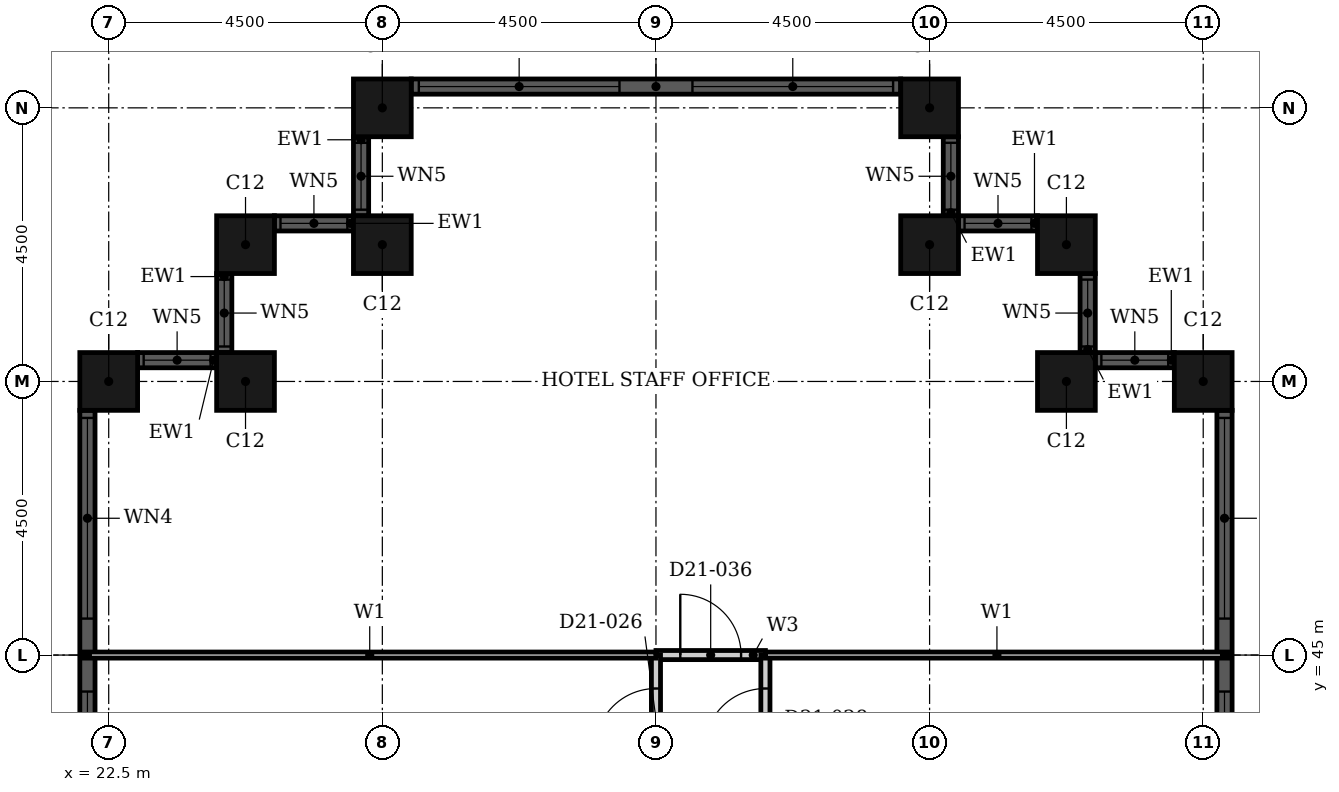
"""IFC4 building model, lengths in metres.
Left out: names, types, materials, properties, quantities, classifications, styles, units other than length and angle.
Written with IfcOpenShell. Run it as: python <this file> out.ifc"""

import sys

from ifc_helpers import new_model, si_unit, direction, frame, frame_2d, origin, origin_2d, place, context, subcontext, project, spatial, rectangle, hollow_rectangle, extrude, element, fill, save


model = new_model("IFC4")
c1 = context("Model", 3, precision=1e-05, world=origin(), true_north=direction((0.0, 1.0)))
c2 = subcontext(c1, "Body", "Model", "MODEL_VIEW")
j1 = project(units=[si_unit("LENGTHUNIT", "METRE"), si_unit("PLANEANGLEUNIT", "RADIAN")], contexts=[c1])
p1 = place(None, origin())
s1 = spatial("IfcSite", under=j1, at=p1, CompositionType="ELEMENT")
p2 = place(p1, origin())
s2 = spatial("IfcBuilding", under=s1, at=p2, CompositionType="ELEMENT")
p3 = place(p2, frame((0.0, 0.0, 88.8)))
s3 = spatial("IfcBuildingStorey", under=s2, at=p3, CompositionType="ELEMENT", Elevation=88.8)
for number, where, z_axis, x_axis in (
    (1, (40.5, 49.5, 0.0), (0.0, 0.0, 1.0), (1.0, 0.0, 0.0)),
    (2, (38.25, 49.5, 0.0), (0.0, 0.0, 1.0), (1.0, 0.0, 0.0)),
    (3, (38.25, 51.75, 0.0), (0.0, 0.0, 1.0), (1.0, 0.0, 0.0)),
    (4, (36.0, 51.75, 0.0), (0.0, 0.0, 1.0), (1.0, 0.0, 0.0)),
    (5, (36.0, 54.0, 0.0), (0.0, 0.0, 1.0), (1.0, 0.0, 0.0)),
    (6, (27.0, 54.0, 0.0), (0.0, 0.0, 1.0), (1.0, 0.0, 0.0)),
    (7, (27.0, 51.75, 0.0), (0.0, 0.0, 1.0), (1.0, 0.0, 0.0)),
    (8, (24.75, 51.75, 0.0), (0.0, 0.0, 1.0), (1.0, 0.0, 0.0)),
    (9, (24.75, 49.5, 0.0), (0.0, 0.0, 1.0), (1.0, 0.0, 0.0)),
    (10, (22.5, 49.5, 0.0), (0.0, 0.0, 1.0), (1.0, 0.0, 0.0)),
):
    element("IfcColumn", number, at=place(p3, frame(where, z_axis=z_axis, x_axis=x_axis)), inside=s3, PredefinedType="COLUMN", context=c2, shape_type="SweptSolid", body=[
        extrude(hollow_rectangle(XDim=0.95, YDim=0.95, WallThickness=0.03, at=origin_2d()), origin(), (0.0, 0.0, 1.0), 3.6),
    ])
p4 = place(p3, frame((40.85, 40.975, 0.0), z_axis=(0.0, 0.0, 1.0), x_axis=(0.0, 1.0, 0.0)))
e11 = element("IfcWall", 11, at=p4, inside=s3, PredefinedType="SOLIDWALL", context=c2, shape_type="SweptSolid", body=[
    extrude(rectangle(XDim=8.05, YDim=0.25, at=frame_2d((4.025, 0.0))), origin(), (0.0, 0.0, 1.0), 3.6),
])
p5 = place(p4, frame((0.125, 0.0, 0.9)))
e12 = element("IfcOpeningElement", 12, at=p5, cuts=e11, PredefinedType="OPENING", context=c2, shape_type="SweptSolid", body=[
    extrude(rectangle(XDim=3.3, YDim=2.08, at=frame_2d((1.65, 1.04))), frame((0.0, 0.135, 0.0), z_axis=(0.0, -1.0, 0.0), x_axis=(1.0, 0.0, 0.0)), (0.0, 0.0, 1.0), 0.27),
])
p6 = place(p4, frame((4.625, 0.0, 0.9)))
e13 = element("IfcOpeningElement", 13, at=p6, cuts=e11, PredefinedType="OPENING", context=c2, shape_type="SweptSolid", body=[
    extrude(rectangle(XDim=3.3, YDim=2.08, at=frame_2d((1.65, 1.04))), frame((0.0, 0.135, 0.0), z_axis=(0.0, -1.0, 0.0), x_axis=(1.0, 0.0, 0.0)), (0.0, 0.0, 1.0), 0.27),
])
p7 = place(p3, frame((40.025, 49.85, 0.0), z_axis=(0.0, 0.0, 1.0), x_axis=(-1.0, 0.0, 0.0)))
e14 = element("IfcWall", 14, at=p7, inside=s3, PredefinedType="SOLIDWALL", context=c2, shape_type="SweptSolid", body=[
    extrude(rectangle(XDim=1.3, YDim=0.25, at=frame_2d((0.65, 0.0))), origin(), (0.0, 0.0, 1.0), 3.6),
])
p8 = place(p7, frame((0.1, 0.0, 0.9)))
e15 = element("IfcOpeningElement", 15, at=p8, cuts=e14, PredefinedType="OPENING", context=c2, shape_type="SweptSolid", body=[
    extrude(rectangle(XDim=1.1, YDim=2.08, at=frame_2d((0.55, 1.04))), frame((0.0, 0.135, 0.0), z_axis=(0.0, -1.0, 0.0), x_axis=(1.0, 0.0, 0.0)), (0.0, 0.0, 1.0), 0.27),
])
p9 = place(p3, frame((38.6, 49.975, 0.0), z_axis=(0.0, 0.0, 1.0), x_axis=(0.0, 1.0, 0.0)))
e16 = element("IfcWall", 16, at=p9, inside=s3, PredefinedType="SOLIDWALL", context=c2, shape_type="SweptSolid", body=[
    extrude(rectangle(XDim=1.3, YDim=0.25, at=frame_2d((0.65, 0.0))), origin(), (0.0, 0.0, 1.0), 3.6),
])
p10 = place(p9, frame((0.1, 0.0, 0.9)))
e17 = element("IfcOpeningElement", 17, at=p10, cuts=e16, PredefinedType="OPENING", context=c2, shape_type="SweptSolid", body=[
    extrude(rectangle(XDim=1.1, YDim=2.08, at=frame_2d((0.55, 1.04))), frame((0.0, 0.135, 0.0), z_axis=(0.0, -1.0, 0.0), x_axis=(1.0, 0.0, 0.0)), (0.0, 0.0, 1.0), 0.27),
])
p11 = place(p3, frame((37.775, 52.1, 0.0), z_axis=(0.0, 0.0, 1.0), x_axis=(-1.0, 0.0, 0.0)))
e18 = element("IfcWall", 18, at=p11, inside=s3, PredefinedType="SOLIDWALL", context=c2, shape_type="SweptSolid", body=[
    extrude(rectangle(XDim=1.3, YDim=0.25, at=frame_2d((0.65, 0.0))), origin(), (0.0, 0.0, 1.0), 3.6),
])
p12 = place(p11, frame((0.1, 0.0, 0.9)))
e19 = element("IfcOpeningElement", 19, at=p12, cuts=e18, PredefinedType="OPENING", context=c2, shape_type="SweptSolid", body=[
    extrude(rectangle(XDim=1.1, YDim=2.08, at=frame_2d((0.55, 1.04))), frame((0.0, 0.135, 0.0), z_axis=(0.0, -1.0, 0.0), x_axis=(1.0, 0.0, 0.0)), (0.0, 0.0, 1.0), 0.27),
])
p13 = place(p3, frame((36.35, 52.225, 0.0), z_axis=(0.0, 0.0, 1.0), x_axis=(0.0, 1.0, 0.0)))
e20 = element("IfcWall", 20, at=p13, inside=s3, PredefinedType="SOLIDWALL", context=c2, shape_type="SweptSolid", body=[
    extrude(rectangle(XDim=1.3, YDim=0.25, at=frame_2d((0.65, 0.0))), origin(), (0.0, 0.0, 1.0), 3.6),
])
p14 = place(p13, frame((0.1, 0.0, 0.9)))
e21 = element("IfcOpeningElement", 21, at=p14, cuts=e20, PredefinedType="OPENING", context=c2, shape_type="SweptSolid", body=[
    extrude(rectangle(XDim=1.1, YDim=2.08, at=frame_2d((0.55, 1.04))), frame((0.0, 0.135, 0.0), z_axis=(0.0, -1.0, 0.0), x_axis=(1.0, 0.0, 0.0)), (0.0, 0.0, 1.0), 0.27),
])
p15 = place(p3, frame((35.525, 54.35, 0.0), z_axis=(0.0, 0.0, 1.0), x_axis=(-1.0, 0.0, 0.0)))
e22 = element("IfcWall", 22, at=p15, inside=s3, PredefinedType="SOLIDWALL", context=c2, shape_type="SweptSolid", body=[
    extrude(rectangle(XDim=8.05, YDim=0.25, at=frame_2d((4.025, 0.0))), origin(), (0.0, 0.0, 1.0), 3.6),
])
p16 = place(p15, frame((0.125, 0.0, 0.9)))
e23 = element("IfcOpeningElement", 23, at=p16, cuts=e22, PredefinedType="OPENING", context=c2, shape_type="SweptSolid", body=[
    extrude(rectangle(XDim=3.3, YDim=2.08, at=frame_2d((1.65, 1.04))), frame((0.0, 0.135, 0.0), z_axis=(0.0, -1.0, 0.0), x_axis=(1.0, 0.0, 0.0)), (0.0, 0.0, 1.0), 0.27),
])
p17 = place(p15, frame((4.625, 0.0, 0.9)))
e24 = element("IfcOpeningElement", 24, at=p17, cuts=e22, PredefinedType="OPENING", context=c2, shape_type="SweptSolid", body=[
    extrude(rectangle(XDim=3.3, YDim=2.08, at=frame_2d((1.65, 1.04))), frame((0.0, 0.135, 0.0), z_axis=(0.0, -1.0, 0.0), x_axis=(1.0, 0.0, 0.0)), (0.0, 0.0, 1.0), 0.27),
])
p18 = place(p3, frame((26.65, 53.525, 0.0), z_axis=(0.0, 0.0, 1.0), x_axis=(0.0, -1.0, 0.0)))
e25 = element("IfcWall", 25, at=p18, inside=s3, PredefinedType="SOLIDWALL", context=c2, shape_type="SweptSolid", body=[
    extrude(rectangle(XDim=1.3, YDim=0.25, at=frame_2d((0.65, 0.0))), origin(), (0.0, 0.0, 1.0), 3.6),
])
p19 = place(p18, frame((0.1, 0.0, 0.9)))
e26 = element("IfcOpeningElement", 26, at=p19, cuts=e25, PredefinedType="OPENING", context=c2, shape_type="SweptSolid", body=[
    extrude(rectangle(XDim=1.1, YDim=2.08, at=frame_2d((0.55, 1.04))), frame((0.0, 0.135, 0.0), z_axis=(0.0, -1.0, 0.0), x_axis=(1.0, 0.0, 0.0)), (0.0, 0.0, 1.0), 0.27),
])
p20 = place(p3, frame((26.525, 52.1, 0.0), z_axis=(0.0, 0.0, 1.0), x_axis=(-1.0, 0.0, 0.0)))
e27 = element("IfcWall", 27, at=p20, inside=s3, PredefinedType="SOLIDWALL", context=c2, shape_type="SweptSolid", body=[
    extrude(rectangle(XDim=1.3, YDim=0.25, at=frame_2d((0.65, 0.0))), origin(), (0.0, 0.0, 1.0), 3.6),
])
p21 = place(p20, frame((0.1, 0.0, 0.9)))
e28 = element("IfcOpeningElement", 28, at=p21, cuts=e27, PredefinedType="OPENING", context=c2, shape_type="SweptSolid", body=[
    extrude(rectangle(XDim=1.1, YDim=2.08, at=frame_2d((0.55, 1.04))), frame((0.0, 0.135, 0.0), z_axis=(0.0, -1.0, 0.0), x_axis=(1.0, 0.0, 0.0)), (0.0, 0.0, 1.0), 0.27),
])
p22 = place(p3, frame((24.4, 51.275, 0.0), z_axis=(0.0, 0.0, 1.0), x_axis=(0.0, -1.0, 0.0)))
e29 = element("IfcWall", 29, at=p22, inside=s3, PredefinedType="SOLIDWALL", context=c2, shape_type="SweptSolid", body=[
    extrude(rectangle(XDim=1.3, YDim=0.25, at=frame_2d((0.65, 0.0))), origin(), (0.0, 0.0, 1.0), 3.6),
])
p23 = place(p22, frame((0.1, 0.0, 0.9)))
e30 = element("IfcOpeningElement", 30, at=p23, cuts=e29, PredefinedType="OPENING", context=c2, shape_type="SweptSolid", body=[
    extrude(rectangle(XDim=1.1, YDim=2.08, at=frame_2d((0.55, 1.04))), frame((0.0, 0.135, 0.0), z_axis=(0.0, -1.0, 0.0), x_axis=(1.0, 0.0, 0.0)), (0.0, 0.0, 1.0), 0.27),
])
p24 = place(p3, frame((24.275, 49.85, 0.0), z_axis=(0.0, 0.0, 1.0), x_axis=(-1.0, 0.0, 0.0)))
e31 = element("IfcWall", 31, at=p24, inside=s3, PredefinedType="SOLIDWALL", context=c2, shape_type="SweptSolid", body=[
    extrude(rectangle(XDim=1.3, YDim=0.25, at=frame_2d((0.65, 0.0))), origin(), (0.0, 0.0, 1.0), 3.6),
])
p25 = place(p24, frame((0.1, 0.0, 0.9)))
e32 = element("IfcOpeningElement", 32, at=p25, cuts=e31, PredefinedType="OPENING", context=c2, shape_type="SweptSolid", body=[
    extrude(rectangle(XDim=1.1, YDim=2.08, at=frame_2d((0.55, 1.04))), frame((0.0, 0.135, 0.0), z_axis=(0.0, -1.0, 0.0), x_axis=(1.0, 0.0, 0.0)), (0.0, 0.0, 1.0), 0.27),
])
p26 = place(p3, frame((22.15, 49.025, 0.0), z_axis=(0.0, 0.0, 1.0), x_axis=(0.0, -1.0, 0.0)))
e33 = element("IfcWall", 33, at=p26, inside=s3, PredefinedType="SOLIDWALL", context=c2, shape_type="SweptSolid", body=[
    extrude(rectangle(XDim=8.05, YDim=0.25, at=frame_2d((4.025, 0.0))), origin(), (0.0, 0.0, 1.0), 3.6),
])
p27 = place(p26, frame((0.125, 0.0, 0.9)))
e34 = element("IfcOpeningElement", 34, at=p27, cuts=e33, PredefinedType="OPENING", context=c2, shape_type="SweptSolid", body=[
    extrude(rectangle(XDim=3.3, YDim=2.08, at=frame_2d((1.65, 1.04))), frame((0.0, 0.135, 0.0), z_axis=(0.0, -1.0, 0.0), x_axis=(1.0, 0.0, 0.0)), (0.0, 0.0, 1.0), 0.27),
])
p28 = place(p26, frame((4.625, 0.0, 0.9)))
e35 = element("IfcOpeningElement", 35, at=p28, cuts=e33, PredefinedType="OPENING", context=c2, shape_type="SweptSolid", body=[
    extrude(rectangle(XDim=3.3, YDim=2.08, at=frame_2d((1.65, 1.04))), frame((0.0, 0.135, 0.0), z_axis=(0.0, -1.0, 0.0), x_axis=(1.0, 0.0, 0.0)), (0.0, 0.0, 1.0), 0.27),
])
p29 = place(p3, frame((31.5, 45.0, 0.0), z_axis=(0.0, 0.0, 1.0), x_axis=(1.0, 0.0, 0.0)))
e36 = element("IfcWall", 36, at=p29, inside=s3, PredefinedType="PARTITIONING", context=c2, shape_type="SweptSolid", body=[
    extrude(rectangle(XDim=1.8, YDim=0.15, at=frame_2d((0.9, 0.0))), origin(), (0.0, 0.0, 1.0), 3.3),
])
p30 = place(p29, frame((0.4, 0.0, 0.0)))
e37 = element("IfcOpeningElement", 37, at=p30, cuts=e36, PredefinedType="OPENING", context=c2, shape_type="SweptSolid", body=[
    extrude(rectangle(XDim=1.0, YDim=2.1, at=frame_2d((0.5, 1.05))), frame((0.0, 0.085, 0.0), z_axis=(0.0, -1.0, 0.0), x_axis=(1.0, 0.0, 0.0)), (0.0, 0.0, 1.0), 0.17),
])
p31 = place(p3, frame((31.5, 33.3, 0.0), z_axis=(0.0, 0.0, 1.0), x_axis=(0.0, 1.0, 0.0)))
e38 = element("IfcWall", 38, at=p31, inside=s3, PredefinedType="PARTITIONING", context=c2, shape_type="SweptSolid", body=[
    extrude(rectangle(XDim=11.7, YDim=0.15, at=frame_2d((5.85, 0.0))), origin(), (0.0, 0.0, 1.0), 2.58),
])
p32 = place(p31, frame((10.15, 0.0, 0.0)))
e39 = element("IfcOpeningElement", 39, at=p32, cuts=e38, PredefinedType="OPENING", context=c2, shape_type="SweptSolid", body=[
    extrude(rectangle(XDim=1.0, YDim=2.1, at=frame_2d((0.5, 1.05))), frame((0.0, 0.085, 0.0), z_axis=(0.0, -1.0, 0.0), x_axis=(1.0, 0.0, 0.0)), (0.0, 0.0, 1.0), 0.17),
])
p33 = place(p3, frame((33.3, 33.3, 0.0), z_axis=(0.0, 0.0, 1.0), x_axis=(0.0, 1.0, 0.0)))
e40 = element("IfcWall", 40, at=p33, inside=s3, PredefinedType="PARTITIONING", context=c2, shape_type="SweptSolid", body=[
    extrude(rectangle(XDim=11.7, YDim=0.15, at=frame_2d((5.85, 0.0))), origin(), (0.0, 0.0, 1.0), 3.3),
])
p34 = place(p33, frame((10.15, 0.0, 0.0)))
e41 = element("IfcOpeningElement", 41, at=p34, cuts=e40, PredefinedType="OPENING", context=c2, shape_type="SweptSolid", body=[
    extrude(rectangle(XDim=1.0, YDim=2.1, at=frame_2d((0.5, 1.05))), frame((0.0, 0.085, 0.0), z_axis=(0.0, -1.0, 0.0), x_axis=(1.0, 0.0, 0.0)), (0.0, 0.0, 1.0), 0.17),
])
p35 = place(p3, frame((33.3, 45.0, 0.0), z_axis=(0.0, 0.0, 1.0), x_axis=(1.0, 0.0, 0.0)))
e42 = element("IfcWall", 42, at=p35, inside=s3, PredefinedType="PARTITIONING", context=c2, shape_type="SweptSolid", body=[
    extrude(rectangle(XDim=7.615, YDim=0.1, at=frame_2d((3.808, 0.0))), origin(), (0.0, 0.0, 1.0), 3.3),
])
p36 = place(p3, frame((22.085, 45.0, 0.0), z_axis=(0.0, 0.0, 1.0), x_axis=(1.0, 0.0, 0.0)))
e43 = element("IfcWall", 43, at=p36, inside=s3, PredefinedType="PARTITIONING", context=c2, shape_type="SweptSolid", body=[
    extrude(rectangle(XDim=9.415, YDim=0.1, at=frame_2d((4.708, 0.0))), origin(), (0.0, 0.0, 1.0), 3.3),
])
p37 = place(p5, origin())
e44 = element("IfcWindow", 44, at=p37, inside=s3, PartitioningType="SINGLE_PANEL", PredefinedType="WINDOW", context=c2, shape_type="SweptSolid", body=[
    extrude(rectangle(XDim=3.3, YDim=2.08, at=frame_2d((1.65, 1.04))), frame((0.0, 0.03, 0.0), z_axis=(0.0, -1.0, 0.0), x_axis=(1.0, 0.0, 0.0)), (0.0, 0.0, 1.0), 0.06),
])
fill(e12, e44)
p38 = place(p6, origin())
e45 = element("IfcWindow", 45, at=p38, inside=s3, PartitioningType="SINGLE_PANEL", PredefinedType="WINDOW", context=c2, shape_type="SweptSolid", body=[
    extrude(rectangle(XDim=3.3, YDim=2.08, at=frame_2d((1.65, 1.04))), frame((0.0, 0.03, 0.0), z_axis=(0.0, -1.0, 0.0), x_axis=(1.0, 0.0, 0.0)), (0.0, 0.0, 1.0), 0.06),
])
fill(e13, e45)
p39 = place(p8, origin())
e46 = element("IfcWindow", 46, at=p39, inside=s3, PartitioningType="SINGLE_PANEL", PredefinedType="WINDOW", context=c2, shape_type="SweptSolid", body=[
    extrude(rectangle(XDim=1.1, YDim=2.08, at=frame_2d((0.55, 1.04))), frame((0.0, 0.03, 0.0), z_axis=(0.0, -1.0, 0.0), x_axis=(1.0, 0.0, 0.0)), (0.0, 0.0, 1.0), 0.06),
])
fill(e15, e46)
p40 = place(p10, origin())
e47 = element("IfcWindow", 47, at=p40, inside=s3, PartitioningType="SINGLE_PANEL", PredefinedType="WINDOW", context=c2, shape_type="SweptSolid", body=[
    extrude(rectangle(XDim=1.1, YDim=2.08, at=frame_2d((0.55, 1.04))), frame((0.0, 0.03, 0.0), z_axis=(0.0, -1.0, 0.0), x_axis=(1.0, 0.0, 0.0)), (0.0, 0.0, 1.0), 0.06),
])
fill(e17, e47)
p41 = place(p12, origin())
e48 = element("IfcWindow", 48, at=p41, inside=s3, PartitioningType="SINGLE_PANEL", PredefinedType="WINDOW", context=c2, shape_type="SweptSolid", body=[
    extrude(rectangle(XDim=1.1, YDim=2.08, at=frame_2d((0.55, 1.04))), frame((0.0, 0.03, 0.0), z_axis=(0.0, -1.0, 0.0), x_axis=(1.0, 0.0, 0.0)), (0.0, 0.0, 1.0), 0.06),
])
fill(e19, e48)
p42 = place(p14, origin())
e49 = element("IfcWindow", 49, at=p42, inside=s3, PartitioningType="SINGLE_PANEL", PredefinedType="WINDOW", context=c2, shape_type="SweptSolid", body=[
    extrude(rectangle(XDim=1.1, YDim=2.08, at=frame_2d((0.55, 1.04))), frame((0.0, 0.03, 0.0), z_axis=(0.0, -1.0, 0.0), x_axis=(1.0, 0.0, 0.0)), (0.0, 0.0, 1.0), 0.06),
])
fill(e21, e49)
p43 = place(p16, origin())
e50 = element("IfcWindow", 50, at=p43, inside=s3, PartitioningType="SINGLE_PANEL", PredefinedType="WINDOW", context=c2, shape_type="SweptSolid", body=[
    extrude(rectangle(XDim=3.3, YDim=2.08, at=frame_2d((1.65, 1.04))), frame((0.0, 0.03, 0.0), z_axis=(0.0, -1.0, 0.0), x_axis=(1.0, 0.0, 0.0)), (0.0, 0.0, 1.0), 0.06),
])
fill(e23, e50)
p44 = place(p17, origin())
e51 = element("IfcWindow", 51, at=p44, inside=s3, PartitioningType="SINGLE_PANEL", PredefinedType="WINDOW", context=c2, shape_type="SweptSolid", body=[
    extrude(rectangle(XDim=3.3, YDim=2.08, at=frame_2d((1.65, 1.04))), frame((0.0, 0.03, 0.0), z_axis=(0.0, -1.0, 0.0), x_axis=(1.0, 0.0, 0.0)), (0.0, 0.0, 1.0), 0.06),
])
fill(e24, e51)
p45 = place(p19, origin())
e52 = element("IfcWindow", 52, at=p45, inside=s3, PartitioningType="SINGLE_PANEL", PredefinedType="WINDOW", context=c2, shape_type="SweptSolid", body=[
    extrude(rectangle(XDim=1.1, YDim=2.08, at=frame_2d((0.55, 1.04))), frame((0.0, 0.03, 0.0), z_axis=(0.0, -1.0, 0.0), x_axis=(1.0, 0.0, 0.0)), (0.0, 0.0, 1.0), 0.06),
])
fill(e26, e52)
p46 = place(p21, origin())
e53 = element("IfcWindow", 53, at=p46, inside=s3, PartitioningType="SINGLE_PANEL", PredefinedType="WINDOW", context=c2, shape_type="SweptSolid", body=[
    extrude(rectangle(XDim=1.1, YDim=2.08, at=frame_2d((0.55, 1.04))), frame((0.0, 0.03, 0.0), z_axis=(0.0, -1.0, 0.0), x_axis=(1.0, 0.0, 0.0)), (0.0, 0.0, 1.0), 0.06),
])
fill(e28, e53)
p47 = place(p23, origin())
e54 = element("IfcWindow", 54, at=p47, inside=s3, PartitioningType="SINGLE_PANEL", PredefinedType="WINDOW", context=c2, shape_type="SweptSolid", body=[
    extrude(rectangle(XDim=1.1, YDim=2.08, at=frame_2d((0.55, 1.04))), frame((0.0, 0.03, 0.0), z_axis=(0.0, -1.0, 0.0), x_axis=(1.0, 0.0, 0.0)), (0.0, 0.0, 1.0), 0.06),
])
fill(e30, e54)
p48 = place(p25, origin())
e55 = element("IfcWindow", 55, at=p48, inside=s3, PartitioningType="SINGLE_PANEL", PredefinedType="WINDOW", context=c2, shape_type="SweptSolid", body=[
    extrude(rectangle(XDim=1.1, YDim=2.08, at=frame_2d((0.55, 1.04))), frame((0.0, 0.03, 0.0), z_axis=(0.0, -1.0, 0.0), x_axis=(1.0, 0.0, 0.0)), (0.0, 0.0, 1.0), 0.06),
])
fill(e32, e55)
p49 = place(p27, origin())
e56 = element("IfcWindow", 56, at=p49, inside=s3, PartitioningType="SINGLE_PANEL", PredefinedType="WINDOW", context=c2, shape_type="SweptSolid", body=[
    extrude(rectangle(XDim=3.3, YDim=2.08, at=frame_2d((1.65, 1.04))), frame((0.0, 0.03, 0.0), z_axis=(0.0, -1.0, 0.0), x_axis=(1.0, 0.0, 0.0)), (0.0, 0.0, 1.0), 0.06),
])
fill(e34, e56)
p50 = place(p28, origin())
e57 = element("IfcWindow", 57, at=p50, inside=s3, PartitioningType="SINGLE_PANEL", PredefinedType="WINDOW", context=c2, shape_type="SweptSolid", body=[
    extrude(rectangle(XDim=3.3, YDim=2.08, at=frame_2d((1.65, 1.04))), frame((0.0, 0.03, 0.0), z_axis=(0.0, -1.0, 0.0), x_axis=(1.0, 0.0, 0.0)), (0.0, 0.0, 1.0), 0.06),
])
fill(e35, e57)
p51 = place(p32, origin())
e58 = element("IfcDoor", 58, at=p51, inside=s3, OperationType="SINGLE_SWING_RIGHT", PredefinedType="DOOR", context=c2, shape_type="SweptSolid", body=[
    extrude(rectangle(XDim=1.0, YDim=2.1, at=frame_2d((0.5, 1.05))), frame((0.0, 0.025, 0.0), z_axis=(0.0, -1.0, 0.0), x_axis=(1.0, 0.0, 0.0)), (0.0, 0.0, 1.0), 0.05),
])
fill(e39, e58)
p52 = place(p34, origin())
e59 = element("IfcDoor", 59, at=p52, inside=s3, OperationType="SINGLE_SWING_RIGHT", PredefinedType="DOOR", context=c2, shape_type="SweptSolid", body=[
    extrude(rectangle(XDim=1.0, YDim=2.1, at=frame_2d((0.5, 1.05))), frame((0.0, 0.025, 0.0), z_axis=(0.0, -1.0, 0.0), x_axis=(1.0, 0.0, 0.0)), (0.0, 0.0, 1.0), 0.05),
])
fill(e41, e59)
p53 = place(p30, origin())
e60 = element("IfcDoor", 60, at=p53, inside=s3, OperationType="SINGLE_SWING_LEFT", PredefinedType="DOOR", context=c2, shape_type="SweptSolid", body=[
    extrude(rectangle(XDim=1.0, YDim=2.1, at=frame_2d((0.5, 1.05))), frame((0.0, 0.025, 0.0), z_axis=(0.0, -1.0, 0.0), x_axis=(1.0, 0.0, 0.0)), (0.0, 0.0, 1.0), 0.05),
])
fill(e37, e60)
save(model, sys.argv[1])
